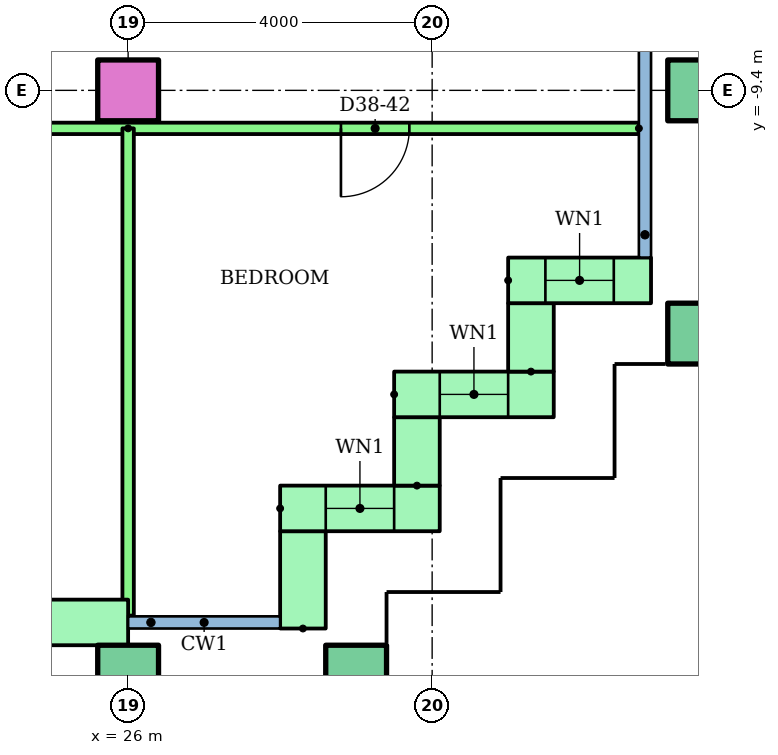
"""IFC4 building model, lengths in metres.
Left out: names, types, materials, properties, quantities, classifications, styles, units other than length and angle.
Written with IfcOpenShell. Run it as: python <this file> out.ifc"""

import sys

from ifc_helpers import new_model, si_unit, direction, frame, frame_2d, origin, origin_2d, place, context, subcontext, project, spatial, rectangle, hollow_rectangle, extrude, element, fill, save


model = new_model("IFC4")
c1 = context("Model", 3, precision=1e-05, world=origin(), true_north=direction((0.0, 1.0)))
c2 = subcontext(c1, "Body", "Model", "MODEL_VIEW")
j1 = project(units=[si_unit("LENGTHUNIT", "METRE"), si_unit("PLANEANGLEUNIT", "RADIAN")], contexts=[c1])
p1 = place(None, origin())
s1 = spatial("IfcSite", under=j1, at=p1, CompositionType="ELEMENT")
p2 = place(p1, origin())
s2 = spatial("IfcBuilding", under=s1, at=p2, CompositionType="ELEMENT")
p3 = place(p2, frame((0.0, 0.0, 145.4)))
s3 = spatial("IfcBuildingStorey", under=s2, at=p3, CompositionType="ELEMENT", Elevation=145.4)
for number, where in (
    (1, (26.0, -17.1, 0.0)),
    (2, (29.0, -17.1, 0.0)),
    (3, (33.5, -12.6, 0.0)),
):
    element("IfcColumn", number, at=place(p3, frame(where)), inside=s3, PredefinedType="COLUMN", context=c2, shape_type="SweptSolid", body=[
        extrude(hollow_rectangle(XDim=0.8, YDim=0.8, WallThickness=0.04, at=origin_2d()), origin(), (0.0, 0.0, 1.0), 3.2),
    ])
p4 = place(p3, frame((26.0, -9.4, 0.0)))
e4 = element("IfcColumn", 4, at=p4, inside=s3, PredefinedType="COLUMN", context=c2, shape_type="SweptSolid", body=[
    extrude(rectangle(XDim=0.8, YDim=0.8, at=origin_2d()), origin(), (0.0, 0.0, 1.0), 3.2),
])
p5 = place(p3, frame((33.5, -9.4, 0.0)))
e5 = element("IfcColumn", 5, at=p5, inside=s3, PredefinedType="COLUMN", context=c2, shape_type="SweptSolid", body=[
    extrude(hollow_rectangle(XDim=0.8, YDim=0.8, WallThickness=0.04, at=origin_2d()), origin(), (0.0, 0.0, 1.0), 3.2),
])
p6 = place(p3, frame((22.0, -16.4, 0.0)))
e6 = element("IfcWall", 6, at=p6, inside=s3, PredefinedType="STANDARD", context=c2, shape_type="SweptSolid", body=[
    extrude(rectangle(XDim=4.0, YDim=0.6, at=frame_2d((2.0, 0.0))), origin(), (0.0, 0.0, 1.0), 2.92),
])
p7 = place(p6, frame((1.4, 0.0, 0.0)))
e7 = element("IfcOpeningElement", 7, at=p7, cuts=e6, PredefinedType="OPENING", context=c2, shape_type="SweptSolid", body=[
    extrude(rectangle(XDim=1.2, YDim=2.1, at=frame_2d((0.6, 1.05))), frame((0.0, 0.31, 0.0), z_axis=(0.0, -1.0, 0.0), x_axis=(1.0, 0.0, 0.0)), (0.0, 0.0, 1.0), 0.62),
])
p8 = place(p3, frame((28.3, -16.48, 0.0), z_axis=(0.0, 0.0, 1.0), x_axis=(0.0, 1.0, 0.0)))
e8 = element("IfcWall", 8, at=p8, inside=s3, PredefinedType="STANDARD", context=c2, shape_type="SweptSolid", body=[
    extrude(rectangle(XDim=1.28, YDim=0.6, at=frame_2d((0.64, 0.0))), origin(), (0.0, 0.0, 1.0), 2.92),
])
p9 = place(p3, frame((28.0, -14.9, 0.0)))
e9 = element("IfcWall", 9, at=p9, inside=s3, PredefinedType="STANDARD", context=c2, shape_type="SweptSolid", body=[
    extrude(rectangle(XDim=2.1, YDim=0.6, at=frame_2d((1.05, 0.0))), origin(), (0.0, 0.0, 1.0), 2.92),
])
p10 = place(p9, frame((0.6, 0.0, 0.9)))
e10 = element("IfcOpeningElement", 10, at=p10, cuts=e9, PredefinedType="OPENING", context=c2, shape_type="SweptSolid", body=[
    extrude(rectangle(XDim=0.9, YDim=1.5, at=frame_2d((0.45, 0.75))), frame((0.0, 0.31, 0.0), z_axis=(0.0, -1.0, 0.0), x_axis=(1.0, 0.0, 0.0)), (0.0, 0.0, 1.0), 0.62),
])
p11 = place(p3, frame((29.8, -14.6, 0.0), z_axis=(0.0, 0.0, 1.0), x_axis=(0.0, 1.0, 0.0)))
e11 = element("IfcWall", 11, at=p11, inside=s3, PredefinedType="STANDARD", context=c2, shape_type="SweptSolid", body=[
    extrude(rectangle(XDim=0.9, YDim=0.6, at=frame_2d((0.45, 0.0))), origin(), (0.0, 0.0, 1.0), 2.92),
])
p12 = place(p3, frame((29.5, -13.4, 0.0)))
e12 = element("IfcWall", 12, at=p12, inside=s3, PredefinedType="STANDARD", context=c2, shape_type="SweptSolid", body=[
    extrude(rectangle(XDim=2.1, YDim=0.6, at=frame_2d((1.05, 0.0))), origin(), (0.0, 0.0, 1.0), 2.92),
])
p13 = place(p12, frame((0.6, 0.0, 0.9)))
e13 = element("IfcOpeningElement", 13, at=p13, cuts=e12, PredefinedType="OPENING", context=c2, shape_type="SweptSolid", body=[
    extrude(rectangle(XDim=0.9, YDim=1.5, at=frame_2d((0.45, 0.75))), frame((0.0, 0.31, 0.0), z_axis=(0.0, -1.0, 0.0), x_axis=(1.0, 0.0, 0.0)), (0.0, 0.0, 1.0), 0.62),
])
p14 = place(p3, frame((31.3, -13.1, 0.0), z_axis=(0.0, 0.0, 1.0), x_axis=(0.0, 1.0, 0.0)))
e14 = element("IfcWall", 14, at=p14, inside=s3, PredefinedType="STANDARD", context=c2, shape_type="SweptSolid", body=[
    extrude(rectangle(XDim=0.9, YDim=0.6, at=frame_2d((0.45, 0.0))), origin(), (0.0, 0.0, 1.0), 2.92),
])
p15 = place(p3, frame((31.0, -11.9, 0.0)))
e15 = element("IfcWall", 15, at=p15, inside=s3, PredefinedType="STANDARD", context=c2, shape_type="SweptSolid", body=[
    extrude(rectangle(XDim=1.88, YDim=0.6, at=frame_2d((0.94, 0.0))), origin(), (0.0, 0.0, 1.0), 2.92),
])
p16 = place(p15, frame((0.49, 0.0, 0.9)))
e16 = element("IfcOpeningElement", 16, at=p16, cuts=e15, PredefinedType="OPENING", context=c2, shape_type="SweptSolid", body=[
    extrude(rectangle(XDim=0.9, YDim=1.5, at=frame_2d((0.45, 0.75))), frame((0.0, 0.31, 0.0), z_axis=(0.0, -1.0, 0.0), x_axis=(1.0, 0.0, 0.0)), (0.0, 0.0, 1.0), 0.62),
])
p17 = place(p3, frame((32.72, -9.9, 0.0), z_axis=(0.0, 0.0, 1.0), x_axis=(-1.0, 0.0, 0.0)))
e17 = element("IfcWall", 17, at=p17, inside=s3, PredefinedType="PARTITIONING", context=c2, shape_type="SweptSolid", body=[
    extrude(rectangle(XDim=14.72, YDim=0.15, at=frame_2d((7.36, 0.0))), origin(), (0.0, 0.0, 1.0), 2.4),
])
p18 = place(p17, frame((12.27, 0.0, 0.0)))
e18 = element("IfcOpeningElement", 18, at=p18, cuts=e17, PredefinedType="OPENING", context=c2, shape_type="SweptSolid", body=[
    extrude(rectangle(XDim=0.9, YDim=2.1, at=frame_2d((0.45, 1.05))), frame((0.0, 0.085, 0.0), z_axis=(0.0, -1.0, 0.0), x_axis=(1.0, 0.0, 0.0)), (0.0, 0.0, 1.0), 0.17),
])
p19 = place(p17, frame((8.22, 0.0, 0.0)))
e19 = element("IfcOpeningElement", 19, at=p19, cuts=e17, PredefinedType="OPENING", context=c2, shape_type="SweptSolid", body=[
    extrude(rectangle(XDim=1.0, YDim=2.1, at=frame_2d((0.5, 1.05))), frame((0.0, 0.085, 0.0), z_axis=(0.0, -1.0, 0.0), x_axis=(1.0, 0.0, 0.0)), (0.0, 0.0, 1.0), 0.17),
])
p20 = place(p17, frame((3.02, 0.0, 0.0)))
e20 = element("IfcOpeningElement", 20, at=p20, cuts=e17, PredefinedType="OPENING", context=c2, shape_type="SweptSolid", body=[
    extrude(rectangle(XDim=0.9, YDim=2.1, at=frame_2d((0.45, 1.05))), frame((0.0, 0.085, 0.0), z_axis=(0.0, -1.0, 0.0), x_axis=(1.0, 0.0, 0.0)), (0.0, 0.0, 1.0), 0.17),
])
p21 = place(p3, frame((26.0, -9.9, 0.0), z_axis=(0.0, 0.0, 1.0), x_axis=(0.0, -1.0, 0.0)))
e21 = element("IfcWall", 21, at=p21, inside=s3, PredefinedType="PARTITIONING", context=c2, shape_type="SweptSolid", body=[
    extrude(rectangle(XDim=6.41, YDim=0.15, at=frame_2d((3.205, 0.0))), origin(), (0.0, 0.0, 1.0), 2.4),
])
p22 = place(p10, origin())
e22 = element("IfcWindow", 22, at=p22, inside=s3, PartitioningType="SINGLE_PANEL", PredefinedType="WINDOW", context=c2, shape_type="SweptSolid", body=[
    extrude(rectangle(XDim=0.9, YDim=1.5, at=frame_2d((0.45, 0.75))), frame((0.0, 0.03, 0.0), z_axis=(0.0, -1.0, 0.0), x_axis=(1.0, 0.0, 0.0)), (0.0, 0.0, 1.0), 0.06),
])
fill(e10, e22)
p23 = place(p13, origin())
e23 = element("IfcWindow", 23, at=p23, inside=s3, PartitioningType="SINGLE_PANEL", PredefinedType="WINDOW", context=c2, shape_type="SweptSolid", body=[
    extrude(rectangle(XDim=0.9, YDim=1.5, at=frame_2d((0.45, 0.75))), frame((0.0, 0.03, 0.0), z_axis=(0.0, -1.0, 0.0), x_axis=(1.0, 0.0, 0.0)), (0.0, 0.0, 1.0), 0.06),
])
fill(e13, e23)
p24 = place(p16, origin())
e24 = element("IfcWindow", 24, at=p24, inside=s3, PartitioningType="SINGLE_PANEL", PredefinedType="WINDOW", context=c2, shape_type="SweptSolid", body=[
    extrude(rectangle(XDim=0.9, YDim=1.5, at=frame_2d((0.45, 0.75))), frame((0.0, 0.03, 0.0), z_axis=(0.0, -1.0, 0.0), x_axis=(1.0, 0.0, 0.0)), (0.0, 0.0, 1.0), 0.06),
])
fill(e16, e24)
p25 = place(p20, origin())
e25 = element("IfcDoor", 25, at=p25, inside=s3, OperationType="SINGLE_SWING_RIGHT", PredefinedType="DOOR", context=c2, shape_type="SweptSolid", body=[
    extrude(rectangle(XDim=0.9, YDim=2.1, at=frame_2d((0.45, 1.05))), frame((0.0, 0.025, 0.0), z_axis=(0.0, -1.0, 0.0), x_axis=(1.0, 0.0, 0.0)), (0.0, 0.0, 1.0), 0.05),
])
fill(e20, e25)
save(model, sys.argv[1])
